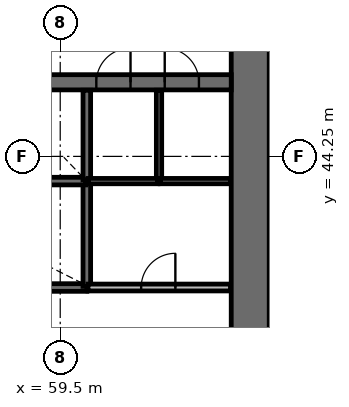
"""IFC4 building model, lengths in metres.
Left out: names, types, materials, properties, quantities, classifications, styles, units other than length and angle.
Written with IfcOpenShell. Run it as: python <this file> out.ifc"""

import sys

from ifc_helpers import new_model, si_unit, direction, frame, frame_2d, origin, place, context, subcontext, project, spatial, rectangle, extrude, source, transform, mapped, element, fill, save


model = new_model("IFC4")
c1 = context("Model", 3, precision=1e-05, world=origin(), true_north=direction((0.0, 1.0)))
c2 = subcontext(c1, "Body", "Model", "MODEL_VIEW")
j1 = project(units=[si_unit("LENGTHUNIT", "METRE"), si_unit("PLANEANGLEUNIT", "RADIAN")], contexts=[c1])
p1 = place(None, origin())
s1 = spatial("IfcSite", under=j1, at=p1, CompositionType="ELEMENT")
p2 = place(p1, origin())
s2 = spatial("IfcBuilding", under=s1, at=p2, CompositionType="ELEMENT")
p3 = place(p2, frame((0.0, 0.0, 5.0)))
s3 = spatial("IfcBuildingStorey", under=s2, at=p3, CompositionType="ELEMENT", Elevation=5.0)
p4 = place(p3, frame((64.5, 38.0, 0.0), z_axis=(0.0, 0.0, 1.0), x_axis=(0.0, 1.0, 0.0)))
e1 = element("IfcWall", 1, at=p4, inside=s3, PredefinedType="SHEAR", context=c2, shape_type="SweptSolid", body=[
    extrude(rectangle(XDim=20.0, YDim=1.0, at=frame_2d((10.0, 0.0))), origin(), (0.0, 0.0, 1.0), 4.4),
])
p5 = place(p4, frame((9.1, 0.0, 0.0)))
e2 = element("IfcOpeningElement", 2, at=p5, cuts=e1, PredefinedType="OPENING", context=c2, shape_type="SweptSolid", body=[
    extrude(rectangle(XDim=1.8, YDim=2.1, at=frame_2d((0.9, 1.05))), frame((0.0, 0.51, 0.0), z_axis=(0.0, -1.0, 0.0), x_axis=(1.0, 0.0, 0.0)), (0.0, 0.0, 1.0), 1.02),
])
p6 = place(p3, frame((40.0, 46.2, 0.0), z_axis=(0.0, 0.0, 1.0), x_axis=(1.0, 0.0, 0.0)))
e3 = element("IfcWall", 3, at=p6, inside=s3, PredefinedType="SHEAR", context=c2, shape_type="SweptSolid", body=[
    extrude(rectangle(XDim=24.0, YDim=0.4, at=frame_2d((12.0, 0.0))), origin(), (0.0, 0.0, 1.0), 4.4),
])
p7 = place(p6, frame((4.5, 0.0, 0.0)))
e4 = element("IfcOpeningElement", 4, at=p7, cuts=e3, PredefinedType="OPENING", context=c2, shape_type="SweptSolid", body=[
    extrude(rectangle(XDim=1.1, YDim=2.1, at=frame_2d((0.55, 1.05))), frame((0.0, 0.21, 0.0), z_axis=(0.0, -1.0, 0.0), x_axis=(1.0, 0.0, 0.0)), (0.0, 0.0, 1.0), 0.42),
])
p8 = place(p6, frame((7.0, 0.0, 0.0)))
e5 = element("IfcOpeningElement", 5, at=p8, cuts=e3, PredefinedType="OPENING", context=c2, shape_type="SweptSolid", body=[
    extrude(rectangle(XDim=1.1, YDim=2.1, at=frame_2d((0.55, 1.05))), frame((0.0, 0.21, 0.0), z_axis=(0.0, -1.0, 0.0), x_axis=(1.0, 0.0, 0.0)), (0.0, 0.0, 1.0), 0.42),
])
p9 = place(p6, frame((9.5, 0.0, 0.0)))
e6 = element("IfcOpeningElement", 6, at=p9, cuts=e3, PredefinedType="OPENING", context=c2, shape_type="SweptSolid", body=[
    extrude(rectangle(XDim=1.1, YDim=2.1, at=frame_2d((0.55, 1.05))), frame((0.0, 0.21, 0.0), z_axis=(0.0, -1.0, 0.0), x_axis=(1.0, 0.0, 0.0)), (0.0, 0.0, 1.0), 0.42),
])
p10 = place(p6, frame((20.45, 0.0, 0.0)))
e7 = element("IfcOpeningElement", 7, at=p10, cuts=e3, PredefinedType="OPENING", context=c2, shape_type="SweptSolid", body=[
    extrude(rectangle(XDim=0.9, YDim=2.1, at=frame_2d((0.45, 1.05))), frame((0.0, 0.21, 0.0), z_axis=(0.0, -1.0, 0.0), x_axis=(1.0, 0.0, 0.0)), (0.0, 0.0, 1.0), 0.42),
])
p11 = place(p6, frame((22.25, 0.0, 0.0)))
e8 = element("IfcOpeningElement", 8, at=p11, cuts=e3, PredefinedType="OPENING", context=c2, shape_type="SweptSolid", body=[
    extrude(rectangle(XDim=0.9, YDim=2.1, at=frame_2d((0.45, 1.05))), frame((0.0, 0.21, 0.0), z_axis=(0.0, -1.0, 0.0), x_axis=(1.0, 0.0, 0.0)), (0.0, 0.0, 1.0), 0.42),
])
p12 = place(p6, frame((0.85, 0.0, 0.0)))
e9 = element("IfcOpeningElement", 9, at=p12, cuts=e3, PredefinedType="OPENING", context=c2, shape_type="SweptSolid", body=[
    extrude(rectangle(XDim=0.9, YDim=2.1, at=frame_2d((0.45, 1.05))), frame((0.0, 0.21, 0.0), z_axis=(0.0, -1.0, 0.0), x_axis=(1.0, 0.0, 0.0)), (0.0, 0.0, 1.0), 0.42),
])
p13 = place(p6, frame((2.65, 0.0, 0.0)))
e10 = element("IfcOpeningElement", 10, at=p13, cuts=e3, PredefinedType="OPENING", context=c2, shape_type="SweptSolid", body=[
    extrude(rectangle(XDim=0.9, YDim=2.1, at=frame_2d((0.45, 1.05))), frame((0.0, 0.21, 0.0), z_axis=(0.0, -1.0, 0.0), x_axis=(1.0, 0.0, 0.0)), (0.0, 0.0, 1.0), 0.42),
])
p14 = place(p6, frame((11.65, 0.0, 0.0)))
e11 = element("IfcOpeningElement", 11, at=p14, cuts=e3, PredefinedType="OPENING", context=c2, shape_type="SweptSolid", body=[
    extrude(rectangle(XDim=0.9, YDim=2.1, at=frame_2d((0.45, 1.05))), frame((0.0, 0.21, 0.0), z_axis=(0.0, -1.0, 0.0), x_axis=(1.0, 0.0, 0.0)), (0.0, 0.0, 1.0), 0.42),
])
p15 = place(p3, frame((53.6, 40.8, 0.0), z_axis=(0.0, 0.0, 1.0), x_axis=(1.0, 0.0, 0.0)))
e12 = element("IfcWall", 12, at=p15, inside=s3, PredefinedType="SOLIDWALL", context=c2, shape_type="SweptSolid", body=[
    extrude(rectangle(XDim=6.6, YDim=0.2, at=frame_2d((3.3, 0.0))), origin(), (0.0, 0.0, 1.0), 4.05),
])
p16 = place(p15, frame((0.3, 0.0, 0.0)))
e13 = element("IfcOpeningElement", 13, at=p16, cuts=e12, PredefinedType="OPENING", context=c2, shape_type="SweptSolid", body=[
    extrude(rectangle(XDim=1.2, YDim=2.1, at=frame_2d((0.6, 1.05))), frame((0.0, 0.11, 0.0), z_axis=(0.0, -1.0, 0.0), x_axis=(1.0, 0.0, 0.0)), (0.0, 0.0, 1.0), 0.22),
])
p17 = place(p3, frame((60.2, 40.83, 0.0), z_axis=(0.0, 0.0, 1.0), x_axis=(0.0, 1.0, 0.0)))
e14 = element("IfcWall", 14, at=p17, inside=s3, PredefinedType="SOLIDWALL", context=c2, shape_type="SweptSolid", body=[
    extrude(rectangle(XDim=2.77, YDim=0.2, at=frame_2d((1.385, 0.0))), origin(), (0.0, 0.0, 1.0), 4.05),
])
p18 = place(p3, frame((57.73, 43.6, 0.0), z_axis=(0.0, 0.0, 1.0), x_axis=(1.0, 0.0, 0.0)))
e15 = element("IfcWall", 15, at=p18, inside=s3, PredefinedType="SOLIDWALL", context=c2, shape_type="SweptSolid", body=[
    extrude(rectangle(XDim=2.44, YDim=0.2, at=frame_2d((1.22, 0.0))), origin(), (0.0, 0.0, 1.0), 4.05),
])
p19 = place(p3, frame((60.2, 43.63, 0.0), z_axis=(0.0, 0.0, 1.0), x_axis=(0.0, 1.0, 0.0)))
e16 = element("IfcWall", 16, at=p19, inside=s3, PredefinedType="SOLIDWALL", context=c2, shape_type="SweptSolid", body=[
    extrude(rectangle(XDim=2.36, YDim=0.2, at=frame_2d((1.18, 0.0))), origin(), (0.0, 0.0, 1.0), 4.05),
])
p20 = place(p3, frame((60.23, 40.8, 0.0), z_axis=(0.0, 0.0, 1.0), x_axis=(1.0, 0.0, 0.0)))
e17 = element("IfcWall", 17, at=p20, inside=s3, PredefinedType="PARTITIONING", context=c2, shape_type="SweptSolid", body=[
    extrude(rectangle(XDim=3.75, YDim=0.18, at=frame_2d((1.875, 0.0))), origin(), (0.0, 0.0, 1.0), 4.05),
])
p21 = place(p20, frame((1.4, 0.0, 0.0)))
e18 = element("IfcOpeningElement", 18, at=p21, cuts=e17, PredefinedType="OPENING", context=c2, shape_type="SweptSolid", body=[
    extrude(rectangle(XDim=0.9, YDim=2.1, at=frame_2d((0.45, 1.05))), frame((0.0, 0.1, 0.0), z_axis=(0.0, -1.0, 0.0), x_axis=(1.0, 0.0, 0.0)), (0.0, 0.0, 1.0), 0.2),
])
p22 = place(p3, frame((62.1, 43.6, 0.0), z_axis=(0.0, 0.0, 1.0), x_axis=(0.0, 1.0, 0.0)))
e19 = element("IfcWall", 19, at=p22, inside=s3, PredefinedType="PARTITIONING", context=c2, shape_type="SweptSolid", body=[
    extrude(rectangle(XDim=2.39, YDim=0.14, at=frame_2d((1.195, 0.0))), origin(), (0.0, 0.0, 1.0), 3.25),
])
p23 = place(p3, frame((60.23, 43.6, 0.0), z_axis=(0.0, 0.0, 1.0), x_axis=(1.0, 0.0, 0.0)))
e20 = element("IfcWall", 20, at=p23, inside=s3, PredefinedType="PARTITIONING", context=c2, shape_type="SweptSolid", body=[
    extrude(rectangle(XDim=1.84, YDim=0.14, at=frame_2d((0.92, 0.0))), origin(), (0.0, 0.0, 1.0), 3.25),
])
p24 = place(p3, frame((62.13, 43.6, 0.0), z_axis=(0.0, 0.0, 1.0), x_axis=(1.0, 0.0, 0.0)))
e21 = element("IfcWall", 21, at=p24, inside=s3, PredefinedType="PARTITIONING", context=c2, shape_type="SweptSolid", body=[
    extrude(rectangle(XDim=1.85, YDim=0.14, at=frame_2d((0.925, 0.0))), origin(), (0.0, 0.0, 1.0), 3.25),
])
m1 = source(origin(), c2, "Body", "SweptSolid", [
    extrude(rectangle(XDim=0.9, YDim=2.1, at=frame_2d((0.45, 1.05))), frame((0.0, 0.025, 0.0), z_axis=(0.0, -1.0, 0.0), x_axis=(1.0, 0.0, 0.0)), (0.0, 0.0, 1.0), 0.05),
])
p25 = place(p10, origin())
e22 = element("IfcDoor", 22, at=p25, inside=s3, OperationType="SINGLE_SWING_RIGHT", PredefinedType="DOOR", context=c2, shape_type="MappedRepresentation", body=[
    mapped(m1, transform((0.0, 0.0, 0.0), scale=1.0)),
])
fill(e7, e22)
p26 = place(p11, origin())
e23 = element("IfcDoor", 23, at=p26, inside=s3, OperationType="SINGLE_SWING_LEFT", PredefinedType="DOOR", context=c2, shape_type="MappedRepresentation", body=[
    mapped(m1, transform((0.0, 0.0, 0.0), scale=1.0)),
])
fill(e8, e23)
p27 = place(p21, origin())
e24 = element("IfcDoor", 24, at=p27, inside=s3, OperationType="SINGLE_SWING_RIGHT", PredefinedType="DOOR", context=c2, shape_type="MappedRepresentation", body=[
    mapped(m1, transform((0.0, 0.0, 0.0), scale=1.0)),
])
fill(e18, e24)
save(model, sys.argv[1])
